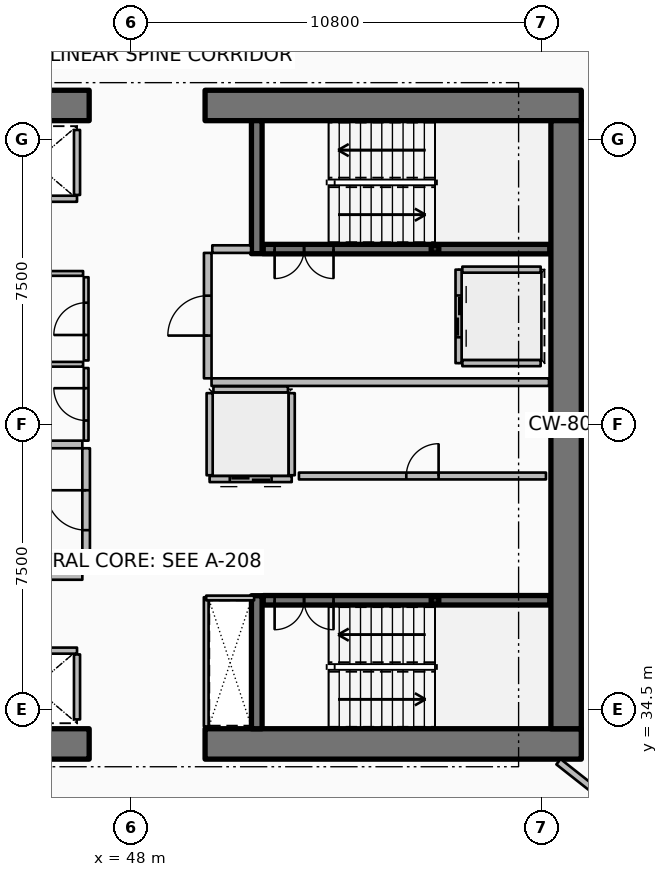
"""IFC4 building model, lengths in metres.
Left out: names, types, materials, properties, quantities, classifications, styles, units other than length and angle.
Written with IfcOpenShell. Run it as: python <this file> out.ifc"""

import sys

from ifc_helpers import new_model, si_unit, direction, frame, frame_2d, origin, origin_2d, place, context, subcontext, project, spatial, rectangle, hollow_rectangle, extrude, element, fill, save


model = new_model("IFC4")
c1 = context("Model", 3, precision=1e-05, world=origin(), true_north=direction((0.0, 1.0)))
c2 = subcontext(c1, "Body", "Model", "MODEL_VIEW")
j1 = project(units=[si_unit("LENGTHUNIT", "METRE"), si_unit("PLANEANGLEUNIT", "RADIAN")], contexts=[c1])
p1 = place(None, origin())
s1 = spatial("IfcSite", under=j1, at=p1, CompositionType="ELEMENT")
p2 = place(p1, origin())
s2 = spatial("IfcBuilding", under=s1, at=p2, CompositionType="ELEMENT")
p3 = place(p2, frame((0.0, 0.0, 135.3)))
s3 = spatial("IfcBuildingStorey", under=s2, at=p3, CompositionType="ELEMENT", Elevation=135.3)
p4 = place(p3, frame((37.0, 33.6, 0.0), z_axis=(0.0, 0.0, 1.0), x_axis=(1.0, 0.0, 0.0)))
e1 = element("IfcWall", 1, at=p4, inside=s3, PredefinedType="SHEAR", context=c2, shape_type="SweptSolid", body=[
    extrude(rectangle(XDim=9.9, YDim=0.8, at=frame_2d((4.95, 0.0))), origin(), (0.0, 0.0, 1.0), 3.75),
])
p5 = place(p3, frame((49.95, 33.6, 0.0), z_axis=(0.0, 0.0, 1.0), x_axis=(1.0, 0.0, 0.0)))
e2 = element("IfcWall", 2, at=p5, inside=s3, PredefinedType="SHEAR", context=c2, shape_type="SweptSolid", body=[
    extrude(rectangle(XDim=9.9, YDim=0.8, at=frame_2d((4.95, 0.0))), origin(), (0.0, 0.0, 1.0), 3.75),
])
p6 = place(p3, frame((37.0, 50.4, 0.0), z_axis=(0.0, 0.0, 1.0), x_axis=(1.0, 0.0, 0.0)))
e3 = element("IfcWall", 3, at=p6, inside=s3, PredefinedType="SHEAR", context=c2, shape_type="SweptSolid", body=[
    extrude(rectangle(XDim=9.9, YDim=0.8, at=frame_2d((4.95, 0.0))), origin(), (0.0, 0.0, 1.0), 3.75),
])
p7 = place(p3, frame((49.95, 50.4, 0.0), z_axis=(0.0, 0.0, 1.0), x_axis=(1.0, 0.0, 0.0)))
e4 = element("IfcWall", 4, at=p7, inside=s3, PredefinedType="SHEAR", context=c2, shape_type="SweptSolid", body=[
    extrude(rectangle(XDim=9.9, YDim=0.8, at=frame_2d((4.95, 0.0))), origin(), (0.0, 0.0, 1.0), 3.75),
])
p8 = place(p3, frame((59.45, 34.0, 0.0), z_axis=(0.0, 0.0, 1.0), x_axis=(0.0, 1.0, 0.0)))
e5 = element("IfcWall", 5, at=p8, inside=s3, PredefinedType="SHEAR", context=c2, shape_type="SweptSolid", body=[
    extrude(rectangle(XDim=16.0, YDim=0.8, at=frame_2d((8.0, 0.0))), origin(), (0.0, 0.0, 1.0), 3.75),
])
for number, where, z_axis, x_axis in (
    (6, (51.31, 46.5, 0.0), (0.0, 0.0, 1.0), (0.0, 1.0, 0.0)),
    (7, (51.31, 34.0, 0.0), (0.0, 0.0, 1.0), (0.0, 1.0, 0.0)),
):
    element("IfcWall", number, at=place(p3, frame(where, z_axis=z_axis, x_axis=x_axis)), inside=s3, PredefinedType="SHEAR", context=c2, shape_type="SweptSolid", body=[
        extrude(rectangle(XDim=3.5, YDim=0.28, at=frame_2d((1.75, 0.0))), origin(), (0.0, 0.0, 1.0), 3.75),
    ])
for number, where, z_axis, x_axis in (
    (8, (56.0, 46.62, 0.0), (0.0, 0.0, 1.0), (1.0, 0.0, 0.0)),
    (9, (56.0, 37.38, 0.0), (0.0, 0.0, 1.0), (1.0, 0.0, 0.0)),
):
    element("IfcColumn", number, at=place(p3, frame(where, z_axis=z_axis, x_axis=x_axis)), inside=s3, PredefinedType="COLUMN", context=c2, shape_type="SweptSolid", body=[
        extrude(hollow_rectangle(XDim=0.2, YDim=0.2, WallThickness=0.01, InnerFilletRadius=0.01, OuterFilletRadius=0.02, at=origin_2d()), origin(), (0.0, 0.0, 1.0), 1.67),
    ])
p9 = place(p3, frame((51.48, 46.62, 0.0), z_axis=(0.0, 0.0, 1.0), x_axis=(1.0, 0.0, 0.0)))
e10 = element("IfcWall", 10, at=p9, inside=s3, PredefinedType="SOLIDWALL", context=c2, shape_type="SweptSolid", body=[
    extrude(rectangle(XDim=7.54, YDim=0.25, at=frame_2d((3.77, 0.0))), origin(), (0.0, 0.0, 1.0), 3.5),
])
p10 = place(p9, frame((0.3, 0.0, 0.0)))
e11 = element("IfcOpeningElement", 11, at=p10, cuts=e10, PredefinedType="OPENING", context=c2, shape_type="SweptSolid", body=[
    extrude(rectangle(XDim=1.55, YDim=2.15, at=frame_2d((0.775, 1.075))), frame((0.0, 0.135, 0.0), z_axis=(0.0, -1.0, 0.0), x_axis=(1.0, 0.0, 0.0)), (0.0, 0.0, 1.0), 0.27),
])
p11 = place(p3, frame((51.48, 37.38, 0.0), z_axis=(0.0, 0.0, 1.0), x_axis=(1.0, 0.0, 0.0)))
e12 = element("IfcWall", 12, at=p11, inside=s3, PredefinedType="SOLIDWALL", context=c2, shape_type="SweptSolid", body=[
    extrude(rectangle(XDim=7.54, YDim=0.25, at=frame_2d((3.77, 0.0))), origin(), (0.0, 0.0, 1.0), 3.5),
])
p12 = place(p11, frame((0.3, 0.0, 0.0)))
e13 = element("IfcOpeningElement", 13, at=p12, cuts=e12, PredefinedType="OPENING", context=c2, shape_type="SweptSolid", body=[
    extrude(rectangle(XDim=1.55, YDim=2.15, at=frame_2d((0.775, 1.075))), frame((0.0, 0.135, 0.0), z_axis=(0.0, -1.0, 0.0), x_axis=(1.0, 0.0, 0.0)), (0.0, 0.0, 1.0), 0.27),
])
p13 = place(p3, frame((46.58, 47.945, 0.0), z_axis=(0.0, 0.0, 1.0), x_axis=(-1.0, 0.0, 0.0)))
e14 = element("IfcWall", 14, at=p13, inside=s3, PredefinedType="PARTITIONING", context=c2, shape_type="SweptSolid", body=[
    extrude(rectangle(XDim=2.26, YDim=0.16, at=frame_2d((1.13, 0.0))), origin(), (0.0, 0.0, 1.0), 3.5),
])
p14 = place(p3, frame((46.58, 48.045, 0.0), z_axis=(0.0, 0.0, 1.0), x_axis=(0.0, 1.0, 0.0)))
e15 = element("IfcWall", 15, at=p14, inside=s3, PredefinedType="PARTITIONING", context=c2, shape_type="SweptSolid", body=[
    extrude(rectangle(XDim=1.71, YDim=0.16, at=frame_2d((0.855, 0.0))), origin(), (0.0, 0.0, 1.0), 3.5),
])
p15 = place(p3, frame((44.32, 36.055, 0.0), z_axis=(0.0, 0.0, 1.0), x_axis=(1.0, 0.0, 0.0)))
e16 = element("IfcWall", 16, at=p15, inside=s3, PredefinedType="PARTITIONING", context=c2, shape_type="SweptSolid", body=[
    extrude(rectangle(XDim=2.26, YDim=0.16, at=frame_2d((1.13, 0.0))), origin(), (0.0, 0.0, 1.0), 3.5),
])
p16 = place(p3, frame((46.58, 34.245, 0.0), z_axis=(0.0, 0.0, 1.0), x_axis=(0.0, 1.0, 0.0)))
e17 = element("IfcWall", 17, at=p16, inside=s3, PredefinedType="PARTITIONING", context=c2, shape_type="SweptSolid", body=[
    extrude(rectangle(XDim=1.71, YDim=0.16, at=frame_2d((0.855, 0.0))), origin(), (0.0, 0.0, 1.0), 3.5),
])
p17 = place(p3, frame((56.62, 46.08, 0.0), z_axis=(0.0, 0.0, 1.0), x_axis=(0.0, -1.0, 0.0)))
e18 = element("IfcWall", 18, at=p17, inside=s3, PredefinedType="PARTITIONING", context=c2, shape_type="SweptSolid", body=[
    extrude(rectangle(XDim=2.46, YDim=0.16, at=frame_2d((1.23, 0.0))), origin(), (0.0, 0.0, 1.0), 3.5),
])
p18 = place(p17, frame((0.68, 0.0, 0.0)))
e19 = element("IfcOpeningElement", 19, at=p18, cuts=e18, PredefinedType="OPENING", context=c2, shape_type="SweptSolid", body=[
    extrude(rectangle(XDim=1.1, YDim=2.1, at=frame_2d((0.55, 1.05))), frame((0.0, 0.09, 0.0), z_axis=(0.0, -1.0, 0.0), x_axis=(1.0, 0.0, 0.0)), (0.0, 0.0, 1.0), 0.18),
])
for number, where, z_axis, x_axis in (
    (20, (56.72, 46.08, 0.0), (0.0, 0.0, 1.0), (1.0, 0.0, 0.0)),
    (21, (56.72, 43.62, 0.0), (0.0, 0.0, 1.0), (1.0, 0.0, 0.0)),
):
    element("IfcWall", number, at=place(p3, frame(where, z_axis=z_axis, x_axis=x_axis)), inside=s3, PredefinedType="PARTITIONING", context=c2, shape_type="SweptSolid", body=[
        extrude(rectangle(XDim=2.06, YDim=0.16, at=frame_2d((1.03, 0.0))), origin(), (0.0, 0.0, 1.0), 3.5),
    ])
p19 = place(p3, frame((52.23, 40.57, 0.0), z_axis=(0.0, 0.0, 1.0), x_axis=(-1.0, 0.0, 0.0)))
e22 = element("IfcWall", 22, at=p19, inside=s3, PredefinedType="PARTITIONING", context=c2, shape_type="SweptSolid", body=[
    extrude(rectangle(XDim=2.16, YDim=0.16, at=frame_2d((1.08, 0.0))), origin(), (0.0, 0.0, 1.0), 3.5),
])
p20 = place(p19, frame((0.53, 0.0, 0.0)))
e23 = element("IfcOpeningElement", 23, at=p20, cuts=e22, PredefinedType="OPENING", context=c2, shape_type="SweptSolid", body=[
    extrude(rectangle(XDim=1.1, YDim=2.1, at=frame_2d((0.55, 1.05))), frame((0.0, 0.09, 0.0), z_axis=(0.0, -1.0, 0.0), x_axis=(1.0, 0.0, 0.0)), (0.0, 0.0, 1.0), 0.18),
])
for number, where, z_axis, x_axis in (
    (24, (52.23, 40.67, 0.0), (0.0, 0.0, 1.0), (0.0, 1.0, 0.0)),
    (25, (50.07, 40.67, 0.0), (0.0, 0.0, 1.0), (0.0, 1.0, 0.0)),
):
    element("IfcWall", number, at=place(p3, frame(where, z_axis=z_axis, x_axis=x_axis)), inside=s3, PredefinedType="PARTITIONING", context=c2, shape_type="SweptSolid", body=[
        extrude(rectangle(XDim=2.16, YDim=0.16, at=frame_2d((1.08, 0.0))), origin(), (0.0, 0.0, 1.0), 3.5),
    ])
p21 = place(p3, frame((50.17, 42.93, 0.0), z_axis=(0.0, 0.0, 1.0), x_axis=(1.0, 0.0, 0.0)))
e26 = element("IfcWall", 26, at=p21, inside=s3, PredefinedType="PARTITIONING", context=c2, shape_type="SweptSolid", body=[
    extrude(rectangle(XDim=1.96, YDim=0.16, at=frame_2d((0.98, 0.0))), origin(), (0.0, 0.0, 1.0), 3.5),
])
p22 = place(p3, frame((52.42, 40.65, 0.0), z_axis=(0.0, 0.0, 1.0), x_axis=(1.0, 0.0, 0.0)))
e27 = element("IfcWall", 27, at=p22, inside=s3, PredefinedType="PARTITIONING", context=c2, shape_type="SweptSolid", body=[
    extrude(rectangle(XDim=6.5, YDim=0.18, at=frame_2d((3.25, 0.0))), origin(), (0.0, 0.0, 1.0), 3.5),
])
p23 = place(p22, frame((2.825, 0.0, 0.0)))
e28 = element("IfcOpeningElement", 28, at=p23, cuts=e27, PredefinedType="OPENING", context=c2, shape_type="SweptSolid", body=[
    extrude(rectangle(XDim=0.85, YDim=2.06, at=frame_2d((0.425, 1.03))), frame((0.0, 0.1, 0.0), z_axis=(0.0, -1.0, 0.0), x_axis=(1.0, 0.0, 0.0)), (0.0, 0.0, 1.0), 0.2),
])
p24 = place(p3, frame((41.35, 38.02, 0.0), z_axis=(0.0, 0.0, 1.0), x_axis=(1.0, 0.0, 0.0)))
e29 = element("IfcWall", 29, at=p24, inside=s3, PredefinedType="PARTITIONING", context=c2, shape_type="SweptSolid", body=[
    extrude(rectangle(XDim=5.37, YDim=0.2, at=frame_2d((2.685, 0.0))), origin(), (0.0, 0.0, 1.0), 3.5),
])
p25 = place(p3, frame((43.92, 41.48, 0.0), z_axis=(0.0, 0.0, 1.0), x_axis=(1.0, 0.0, 0.0)))
e30 = element("IfcWall", 30, at=p25, inside=s3, PredefinedType="PARTITIONING", context=c2, shape_type="SweptSolid", body=[
    extrude(rectangle(XDim=2.8, YDim=0.2, at=frame_2d((1.4, 0.0))), origin(), (0.0, 0.0, 1.0), 3.5),
])
p26 = place(p3, frame((46.82, 38.12, 0.0), z_axis=(0.0, 0.0, 1.0), x_axis=(0.0, 1.0, 0.0)))
e31 = element("IfcWall", 31, at=p26, inside=s3, PredefinedType="PARTITIONING", context=c2, shape_type="SweptSolid", body=[
    extrude(rectangle(XDim=3.26, YDim=0.2, at=frame_2d((1.63, 0.0))), origin(), (0.0, 0.0, 1.0), 3.5),
])
p27 = place(p26, frame((1.105, 0.0, 0.0)))
e32 = element("IfcOpeningElement", 32, at=p27, cuts=e31, PredefinedType="OPENING", context=c2, shape_type="SweptSolid", body=[
    extrude(rectangle(XDim=1.05, YDim=2.1, at=frame_2d((0.525, 1.05))), frame((0.0, 0.11, 0.0), z_axis=(0.0, -1.0, 0.0), x_axis=(1.0, 0.0, 0.0)), (0.0, 0.0, 1.0), 0.22),
])
p28 = place(p3, frame((50.12, 43.12, 0.0), z_axis=(0.0, 0.0, 1.0), x_axis=(1.0, 0.0, 0.0)))
e33 = element("IfcWall", 33, at=p28, inside=s3, PredefinedType="PARTITIONING", context=c2, shape_type="SweptSolid", body=[
    extrude(rectangle(XDim=8.88, YDim=0.2, at=frame_2d((4.44, 0.0))), origin(), (0.0, 0.0, 1.0), 3.5),
])
p29 = place(p3, frame((50.14, 46.62, 0.0), z_axis=(0.0, 0.0, 1.0), x_axis=(1.0, 0.0, 0.0)))
e34 = element("IfcWall", 34, at=p29, inside=s3, PredefinedType="PARTITIONING", context=c2, shape_type="SweptSolid", body=[
    extrude(rectangle(XDim=1.02, YDim=0.2, at=frame_2d((0.51, 0.0))), origin(), (0.0, 0.0, 1.0), 3.5),
])
p30 = place(p3, frame((50.02, 43.22, 0.0), z_axis=(0.0, 0.0, 1.0), x_axis=(0.0, 1.0, 0.0)))
e35 = element("IfcWall", 35, at=p30, inside=s3, PredefinedType="PARTITIONING", context=c2, shape_type="SweptSolid", body=[
    extrude(rectangle(XDim=3.3, YDim=0.2, at=frame_2d((1.65, 0.0))), origin(), (0.0, 0.0, 1.0), 3.5),
])
p31 = place(p30, frame((1.125, 0.0, 0.0)))
e36 = element("IfcOpeningElement", 36, at=p31, cuts=e35, PredefinedType="OPENING", context=c2, shape_type="SweptSolid", body=[
    extrude(rectangle(XDim=1.05, YDim=2.1, at=frame_2d((0.525, 1.05))), frame((0.0, 0.11, 0.0), z_axis=(0.0, -1.0, 0.0), x_axis=(1.0, 0.0, 0.0)), (0.0, 0.0, 1.0), 0.22),
])
p32 = place(p3, frame((49.98, 34.06, 0.0), z_axis=(0.0, 0.0, 1.0), x_axis=(0.0, 1.0, 0.0)))
e37 = element("IfcWall", 37, at=p32, inside=s3, PredefinedType="PARTITIONING", context=c2, shape_type="SweptSolid", body=[
    extrude(rectangle(XDim=3.4, YDim=0.125, at=frame_2d((1.7, 0.0))), origin(), (0.0, 0.0, 1.0), 2.94),
])
p33 = place(p3, frame((49.98, 37.44, 0.0), z_axis=(0.0, 0.0, 1.0), x_axis=(1.0, 0.0, 0.0)))
e38 = element("IfcWall", 38, at=p33, inside=s3, PredefinedType="PARTITIONING", context=c2, shape_type="SweptSolid", body=[
    extrude(rectangle(XDim=1.26, YDim=0.125, at=frame_2d((0.63, 0.0))), origin(), (0.0, 0.0, 1.0), 2.94),
])
p34 = place(p3, frame((44.03, 43.59, 0.0), z_axis=(0.0, 0.0, 1.0), x_axis=(1.0, 0.0, 0.0)))
e39 = element("IfcWall", 39, at=p34, inside=s3, PredefinedType="PARTITIONING", context=c2, shape_type="SweptSolid", body=[
    extrude(rectangle(XDim=2.71, YDim=0.125, at=frame_2d((1.355, 0.0))), origin(), (0.0, 0.0, 1.0), 2.94),
])
p35 = place(p3, frame((46.82, 41.58, 0.0), z_axis=(0.0, 0.0, 1.0), x_axis=(0.0, 1.0, 0.0)))
e40 = element("IfcWall", 40, at=p35, inside=s3, PredefinedType="PARTITIONING", context=c2, shape_type="SweptSolid", body=[
    extrude(rectangle(XDim=1.91, YDim=0.125, at=frame_2d((0.955, 0.0))), origin(), (0.0, 0.0, 1.0), 2.94),
])
p36 = place(p35, frame((0.53, 0.0, 0.0)))
e41 = element("IfcOpeningElement", 41, at=p36, cuts=e40, PredefinedType="OPENING", context=c2, shape_type="SweptSolid", body=[
    extrude(rectangle(XDim=0.85, YDim=2.06, at=frame_2d((0.425, 1.03))), frame((0.0, 0.073, 0.0), z_axis=(0.0, -1.0, 0.0), x_axis=(1.0, 0.0, 0.0)), (0.0, 0.0, 1.0), 0.145),
])
p37 = place(p3, frame((46.82, 43.69, 0.0), z_axis=(0.0, 0.0, 1.0), x_axis=(0.0, 1.0, 0.0)))
e42 = element("IfcWall", 42, at=p37, inside=s3, PredefinedType="PARTITIONING", context=c2, shape_type="SweptSolid", body=[
    extrude(rectangle(XDim=2.19, YDim=0.125, at=frame_2d((1.095, 0.0))), origin(), (0.0, 0.0, 1.0), 2.94),
])
p38 = place(p37, frame((0.67, 0.0, 0.0)))
e43 = element("IfcOpeningElement", 43, at=p38, cuts=e42, PredefinedType="OPENING", context=c2, shape_type="SweptSolid", body=[
    extrude(rectangle(XDim=0.85, YDim=2.06, at=frame_2d((0.425, 1.03))), frame((0.0, 0.073, 0.0), z_axis=(0.0, -1.0, 0.0), x_axis=(1.0, 0.0, 0.0)), (0.0, 0.0, 1.0), 0.145),
])
p39 = place(p3, frame((45.48, 45.98, 0.0), z_axis=(0.0, 0.0, 1.0), x_axis=(1.0, 0.0, 0.0)))
e44 = element("IfcWall", 44, at=p39, inside=s3, PredefinedType="PARTITIONING", context=c2, shape_type="SweptSolid", body=[
    extrude(rectangle(XDim=1.26, YDim=0.125, at=frame_2d((0.63, 0.0))), origin(), (0.0, 0.0, 1.0), 2.94),
])
p40 = place(p3, frame((59.249, 33.132, 0.0), z_axis=(0.0, 0.0, 1.0), x_axis=(0.785334414621, -0.619071770647, 0.0)))
e45 = element("IfcWall", 45, at=p40, inside=s3, PredefinedType="PARTITIONING", context=c2, shape_type="SweptSolid", body=[
    extrude(rectangle(XDim=9.515, YDim=0.18, at=frame_2d((4.758, 0.0))), origin(), (0.0, 0.0, 1.0), 2.94),
])
p41 = place(p10, origin())
e46 = element("IfcDoor", 46, at=p41, inside=s3, OperationType="DOUBLE_DOOR_SINGLE_SWING", PredefinedType="DOOR", context=c2, shape_type="SweptSolid", body=[
    extrude(rectangle(XDim=1.55, YDim=2.15, at=frame_2d((0.775, 1.075))), frame((0.0, 0.025, 0.0), z_axis=(0.0, -1.0, 0.0), x_axis=(1.0, 0.0, 0.0)), (0.0, 0.0, 1.0), 0.05),
])
fill(e11, e46)
p42 = place(p12, origin())
e47 = element("IfcDoor", 47, at=p42, inside=s3, OperationType="DOUBLE_DOOR_SINGLE_SWING", PredefinedType="DOOR", context=c2, shape_type="SweptSolid", body=[
    extrude(rectangle(XDim=1.55, YDim=2.15, at=frame_2d((0.775, 1.075))), frame((0.0, 0.025, 0.0), z_axis=(0.0, -1.0, 0.0), x_axis=(1.0, 0.0, 0.0)), (0.0, 0.0, 1.0), 0.05),
])
fill(e13, e47)
p43 = place(p18, origin())
e48 = element("IfcDoor", 48, at=p43, inside=s3, OperationType="DOUBLE_DOOR_SLIDING", PredefinedType="DOOR", context=c2, shape_type="SweptSolid", body=[
    extrude(rectangle(XDim=1.1, YDim=2.1, at=frame_2d((0.55, 1.05))), frame((0.0, 0.025, 0.0), z_axis=(0.0, -1.0, 0.0), x_axis=(1.0, 0.0, 0.0)), (0.0, 0.0, 1.0), 0.05),
])
fill(e19, e48)
p44 = place(p20, origin())
e49 = element("IfcDoor", 49, at=p44, inside=s3, OperationType="DOUBLE_DOOR_SLIDING", PredefinedType="DOOR", context=c2, shape_type="SweptSolid", body=[
    extrude(rectangle(XDim=1.1, YDim=2.1, at=frame_2d((0.55, 1.05))), frame((0.0, 0.025, 0.0), z_axis=(0.0, -1.0, 0.0), x_axis=(1.0, 0.0, 0.0)), (0.0, 0.0, 1.0), 0.05),
])
fill(e23, e49)
p45 = place(p23, origin())
e50 = element("IfcDoor", 50, at=p45, inside=s3, OperationType="SINGLE_SWING_RIGHT", PredefinedType="DOOR", context=c2, shape_type="SweptSolid", body=[
    extrude(rectangle(XDim=0.85, YDim=2.06, at=frame_2d((0.425, 1.03))), frame((0.0, 0.025, 0.0), z_axis=(0.0, -1.0, 0.0), x_axis=(1.0, 0.0, 0.0)), (0.0, 0.0, 1.0), 0.05),
])
fill(e28, e50)
p46 = place(p27, origin())
e51 = element("IfcDoor", 51, at=p46, inside=s3, OperationType="SINGLE_SWING_RIGHT", PredefinedType="DOOR", context=c2, shape_type="SweptSolid", body=[
    extrude(rectangle(XDim=1.05, YDim=2.1, at=frame_2d((0.525, 1.05))), frame((0.0, 0.025, 0.0), z_axis=(0.0, -1.0, 0.0), x_axis=(1.0, 0.0, 0.0)), (0.0, 0.0, 1.0), 0.05),
])
fill(e32, e51)
p47 = place(p31, origin())
e52 = element("IfcDoor", 52, at=p47, inside=s3, OperationType="SINGLE_SWING_LEFT", PredefinedType="DOOR", context=c2, shape_type="SweptSolid", body=[
    extrude(rectangle(XDim=1.05, YDim=2.1, at=frame_2d((0.525, 1.05))), frame((0.0, 0.025, 0.0), z_axis=(0.0, -1.0, 0.0), x_axis=(1.0, 0.0, 0.0)), (0.0, 0.0, 1.0), 0.05),
])
fill(e36, e52)
p48 = place(p36, origin())
e53 = element("IfcDoor", 53, at=p48, inside=s3, OperationType="SINGLE_SWING_RIGHT", PredefinedType="DOOR", context=c2, shape_type="SweptSolid", body=[
    extrude(rectangle(XDim=0.85, YDim=2.06, at=frame_2d((0.425, 1.03))), frame((0.0, 0.025, 0.0), z_axis=(0.0, -1.0, 0.0), x_axis=(1.0, 0.0, 0.0)), (0.0, 0.0, 1.0), 0.05),
])
fill(e41, e53)
p49 = place(p38, origin())
e54 = element("IfcDoor", 54, at=p49, inside=s3, OperationType="SINGLE_SWING_LEFT", PredefinedType="DOOR", context=c2, shape_type="SweptSolid", body=[
    extrude(rectangle(XDim=0.85, YDim=2.06, at=frame_2d((0.425, 1.03))), frame((0.0, 0.025, 0.0), z_axis=(0.0, -1.0, 0.0), x_axis=(1.0, 0.0, 0.0)), (0.0, 0.0, 1.0), 0.05),
])
fill(e43, e54)
save(model, sys.argv[1])
